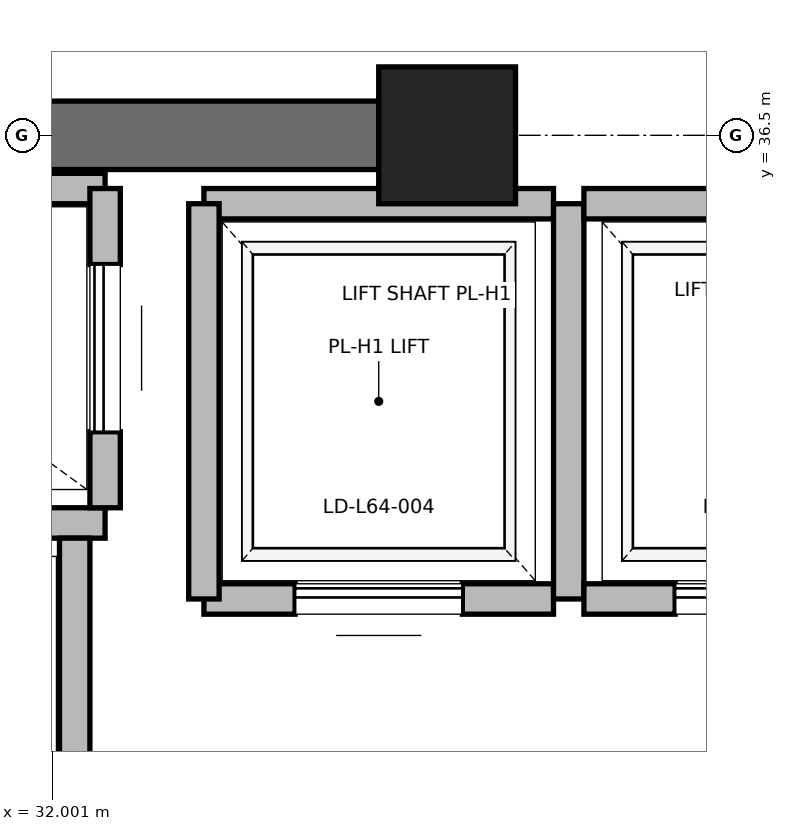
"""IFC4 building model, lengths in metres.
Left out: names, types, materials, properties, quantities, classifications, styles, units other than length and angle.
Written with IfcOpenShell. Run it as: python <this file> out.ifc"""

import sys

from ifc_helpers import new_model, si_unit, direction, frame, frame_2d, origin, origin_2d, place, context, subcontext, project, spatial, rectangle, extrude, element, fill, save


model = new_model("IFC4")
c1 = context("Model", 3, precision=1e-05, world=origin(), true_north=direction((0.0, 1.0)))
c2 = subcontext(c1, "Body", "Model", "MODEL_VIEW")
j1 = project(units=[si_unit("LENGTHUNIT", "METRE"), si_unit("PLANEANGLEUNIT", "RADIAN")], contexts=[c1])
p1 = place(None, origin())
s1 = spatial("IfcSite", under=j1, at=p1, CompositionType="ELEMENT")
p2 = place(p1, origin())
s2 = spatial("IfcBuilding", under=s1, at=p2, CompositionType="ELEMENT")
p3 = place(p2, frame((0.0, 0.0, 275.2)))
s3 = spatial("IfcBuildingStorey", under=s2, at=p3, CompositionType="ELEMENT", Elevation=275.2)
p4 = place(p3, frame((34.6, 36.5, 0.0), z_axis=(0.0, 0.0, 1.0), x_axis=(1.0, 0.0, 0.0)))
e1 = element("IfcColumn", 1, at=p4, inside=s3, PredefinedType="PILASTER", context=c2, shape_type="SweptSolid", body=[
    extrude(rectangle(XDim=0.9, YDim=0.9, at=origin_2d()), origin(), (0.0, 0.0, 1.0), 4.0),
])
p5 = place(p3, frame((29.0, 36.5, 0.0), z_axis=(0.0, 0.0, 1.0), x_axis=(1.0, 0.0, 0.0)))
e2 = element("IfcWall", 2, at=p5, inside=s3, PredefinedType="SHEAR", context=c2, shape_type="SweptSolid", body=[
    extrude(rectangle(XDim=5.8, YDim=0.45, at=frame_2d((2.9, 0.0))), origin(), (0.0, 0.0, 1.0), 3.785),
])
p6 = place(p3, frame((29.55, 33.95, 0.0), z_axis=(0.0, 0.0, 1.0), x_axis=(1.0, 0.0, 0.0)))
e3 = element("IfcWall", 3, at=p6, inside=s3, PredefinedType="SOLIDWALL", context=c2, shape_type="SweptSolid", body=[
    extrude(rectangle(XDim=2.8, YDim=0.2, at=frame_2d((1.4, 0.0))), origin(), (0.0, 0.0, 1.0), 3.785),
])
p7 = place(p3, frame((32.15, 30.85, 0.0), z_axis=(0.0, 0.0, 1.0), x_axis=(0.0, 1.0, 0.0)))
e4 = element("IfcWall", 4, at=p7, inside=s3, PredefinedType="SOLIDWALL", context=c2, shape_type="SweptSolid", body=[
    extrude(rectangle(XDim=3.0, YDim=0.2, at=frame_2d((1.5, 0.0))), origin(), (0.0, 0.0, 1.0), 3.785),
])
p8 = place(p3, frame((32.35, 36.15, 0.0), z_axis=(0.0, 0.0, 1.0), x_axis=(-1.0, 0.0, 0.0)))
e5 = element("IfcWall", 5, at=p8, inside=s3, PredefinedType="SOLIDWALL", context=c2, shape_type="SweptSolid", body=[
    extrude(rectangle(XDim=2.8, YDim=0.2, at=frame_2d((1.4, 0.0))), origin(), (0.0, 0.0, 1.0), 3.148),
])
p9 = place(p3, frame((32.35, 34.05, 0.0), z_axis=(0.0, 0.0, 1.0), x_axis=(0.0, 1.0, 0.0)))
e6 = element("IfcWall", 6, at=p9, inside=s3, PredefinedType="SOLIDWALL", context=c2, shape_type="SweptSolid", body=[
    extrude(rectangle(XDim=2.1, YDim=0.2, at=frame_2d((1.05, 0.0))), origin(), (0.0, 0.0, 1.0), 3.785),
])
p10 = place(p9, frame((0.5, 0.0, 0.0)))
e7 = element("IfcOpeningElement", 7, at=p10, cuts=e6, PredefinedType="OPENING", context=c2, shape_type="SweptSolid", body=[
    extrude(rectangle(XDim=1.1, YDim=2.2, at=frame_2d((0.55, 1.1))), frame((0.0, 0.1, 0.0), z_axis=(0.0, -1.0, 0.0), x_axis=(1.0, 0.0, 0.0)), (0.0, 0.0, 1.0), 0.2),
])
p11 = place(p3, frame((33.0, 33.45, 0.0), z_axis=(0.0, 0.0, 1.0), x_axis=(1.0, 0.0, 0.0)))
e8 = element("IfcWall", 8, at=p11, inside=s3, PredefinedType="SOLIDWALL", context=c2, shape_type="SweptSolid", body=[
    extrude(rectangle(XDim=2.3, YDim=0.2, at=frame_2d((1.15, 0.0))), origin(), (0.0, 0.0, 1.0), 3.785),
])
p12 = place(p11, frame((0.6, 0.0, 0.0)))
e9 = element("IfcOpeningElement", 9, at=p12, cuts=e8, PredefinedType="OPENING", context=c2, shape_type="SweptSolid", body=[
    extrude(rectangle(XDim=1.1, YDim=2.2, at=frame_2d((0.55, 1.1))), frame((0.0, 0.1, 0.0), z_axis=(0.0, -1.0, 0.0), x_axis=(1.0, 0.0, 0.0)), (0.0, 0.0, 1.0), 0.2),
])
p13 = place(p3, frame((35.3, 36.05, 0.0), z_axis=(0.0, 0.0, 1.0), x_axis=(-1.0, 0.0, 0.0)))
e10 = element("IfcWall", 10, at=p13, inside=s3, PredefinedType="SOLIDWALL", context=c2, shape_type="SweptSolid", body=[
    extrude(rectangle(XDim=2.3, YDim=0.2, at=frame_2d((1.15, 0.0))), origin(), (0.0, 0.0, 1.0), 2.865),
])
p14 = place(p3, frame((33.0, 36.05, 0.0), z_axis=(0.0, 0.0, 1.0), x_axis=(0.0, -1.0, 0.0)))
e11 = element("IfcWall", 11, at=p14, inside=s3, PredefinedType="SOLIDWALL", context=c2, shape_type="SweptSolid", body=[
    extrude(rectangle(XDim=2.6, YDim=0.2, at=frame_2d((1.3, 0.0))), origin(), (0.0, 0.0, 1.0), 3.785),
])
p15 = place(p3, frame((35.4, 33.45, 0.0), z_axis=(0.0, 0.0, 1.0), x_axis=(0.0, 1.0, 0.0)))
e12 = element("IfcWall", 12, at=p15, inside=s3, PredefinedType="SOLIDWALL", context=c2, shape_type="SweptSolid", body=[
    extrude(rectangle(XDim=2.6, YDim=0.2, at=frame_2d((1.3, 0.0))), origin(), (0.0, 0.0, 1.0), 2.865),
])
p16 = place(p3, frame((35.5, 33.45, 0.0), z_axis=(0.0, 0.0, 1.0), x_axis=(1.0, 0.0, 0.0)))
e13 = element("IfcWall", 13, at=p16, inside=s3, PredefinedType="SOLIDWALL", context=c2, shape_type="SweptSolid", body=[
    extrude(rectangle(XDim=2.3, YDim=0.2, at=frame_2d((1.15, 0.0))), origin(), (0.0, 0.0, 1.0), 3.785),
])
p17 = place(p16, frame((0.6, 0.0, 0.0)))
e14 = element("IfcOpeningElement", 14, at=p17, cuts=e13, PredefinedType="OPENING", context=c2, shape_type="SweptSolid", body=[
    extrude(rectangle(XDim=1.1, YDim=2.2, at=frame_2d((0.55, 1.1))), frame((0.0, 0.1, 0.0), z_axis=(0.0, -1.0, 0.0), x_axis=(1.0, 0.0, 0.0)), (0.0, 0.0, 1.0), 0.2),
])
p18 = place(p3, frame((37.8, 36.05, 0.0), z_axis=(0.0, 0.0, 1.0), x_axis=(-1.0, 0.0, 0.0)))
e15 = element("IfcWall", 15, at=p18, inside=s3, PredefinedType="SOLIDWALL", context=c2, shape_type="SweptSolid", body=[
    extrude(rectangle(XDim=2.3, YDim=0.2, at=frame_2d((1.15, 0.0))), origin(), (0.0, 0.0, 1.0), 2.865),
])
p19 = place(p10, origin())
e16 = element("IfcDoor", 16, at=p19, inside=s3, OperationType="SLIDING_TO_RIGHT", PredefinedType="DOOR", context=c2, shape_type="SweptSolid", body=[
    extrude(rectangle(XDim=1.1, YDim=2.2, at=frame_2d((0.55, 1.1))), frame((0.0, 0.025, 0.0), z_axis=(0.0, -1.0, 0.0), x_axis=(1.0, 0.0, 0.0)), (0.0, 0.0, 1.0), 0.05),
])
fill(e7, e16)
p20 = place(p12, origin())
e17 = element("IfcDoor", 17, at=p20, inside=s3, OperationType="SLIDING_TO_RIGHT", PredefinedType="DOOR", context=c2, shape_type="SweptSolid", body=[
    extrude(rectangle(XDim=1.1, YDim=2.2, at=frame_2d((0.55, 1.1))), frame((0.0, 0.025, 0.0), z_axis=(0.0, -1.0, 0.0), x_axis=(1.0, 0.0, 0.0)), (0.0, 0.0, 1.0), 0.05),
])
fill(e9, e17)
p21 = place(p17, origin())
e18 = element("IfcDoor", 18, at=p21, inside=s3, OperationType="SLIDING_TO_RIGHT", PredefinedType="DOOR", context=c2, shape_type="SweptSolid", body=[
    extrude(rectangle(XDim=1.1, YDim=2.2, at=frame_2d((0.55, 1.1))), frame((0.0, 0.025, 0.0), z_axis=(0.0, -1.0, 0.0), x_axis=(1.0, 0.0, 0.0)), (0.0, 0.0, 1.0), 0.05),
])
fill(e14, e18)
save(model, sys.argv[1])
